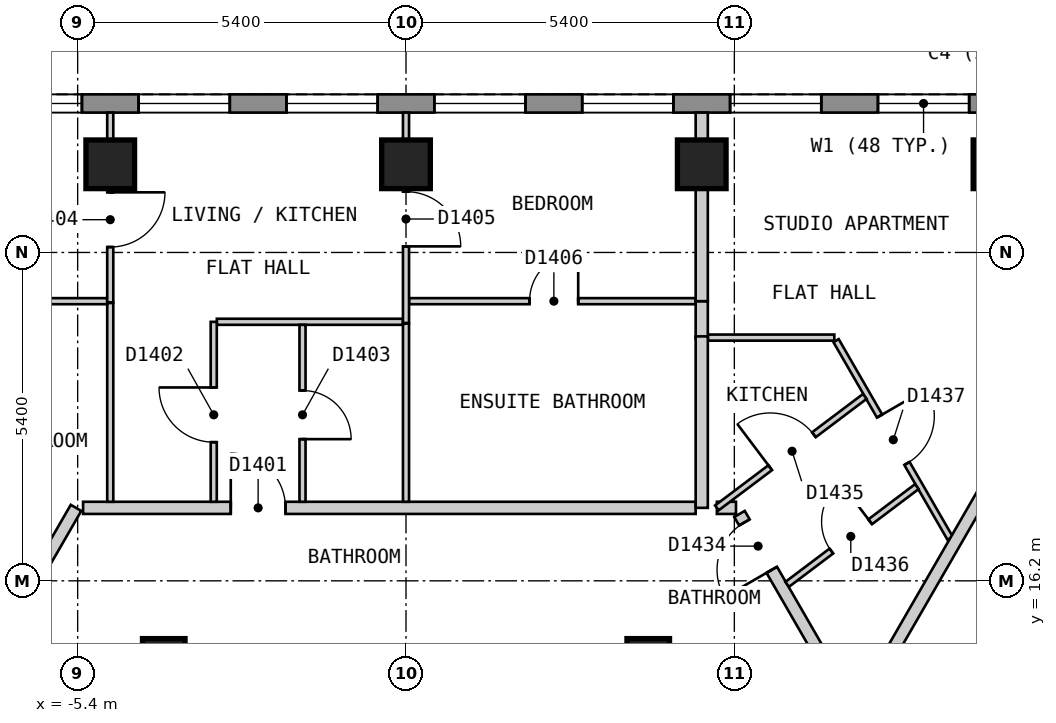
"""IFC4 building model, lengths in metres.
Left out: names, types, materials, properties, quantities, classifications, styles, units other than length and angle.
Written with IfcOpenShell. Run it as: python <this file> out.ifc"""

import sys

from ifc_helpers import new_model, si_unit, direction, frame, frame_2d, origin, origin_2d, place, context, subcontext, project, spatial, polyline, rectangle, outline, extrude, element, fill, save


model = new_model("IFC4")
c1 = context("Model", 3, precision=1e-05, world=origin(), true_north=direction((0.0, 1.0)))
c2 = subcontext(c1, "Body", "Model", "MODEL_VIEW")
j1 = project(units=[si_unit("LENGTHUNIT", "METRE"), si_unit("PLANEANGLEUNIT", "RADIAN")], contexts=[c1])
p1 = place(None, origin())
s1 = spatial("IfcSite", under=j1, at=p1, CompositionType="ELEMENT")
p2 = place(p1, origin())
s2 = spatial("IfcBuilding", under=s1, at=p2, CompositionType="ELEMENT")
p3 = place(p2, frame((0.0, 0.0, 172.2)))
s3 = spatial("IfcBuildingStorey", under=s2, at=p3, CompositionType="ELEMENT", Elevation=172.2)
for number, where, z_axis, x_axis in (
    (1, (9.728, 23.05, 0.0), (0.0, 0.0, 1.0), (-1.0, 0.0, 0.0)),
    (2, (4.864, 23.05, 0.0), (0.0, 0.0, 1.0), (-1.0, 0.0, 0.0)),
    (3, (0.0, 23.05, 0.0), (0.0, 0.0, 1.0), (-1.0, 0.0, 0.0)),
    (4, (-4.864, 23.05, 0.0), (0.0, 0.0, 1.0), (-1.0, 0.0, 0.0)),
):
    element("IfcColumn", number, at=place(p3, frame(where, z_axis=z_axis, x_axis=x_axis)), inside=s3, PredefinedType="COLUMN", context=c2, shape_type="SweptSolid", body=[
        extrude(rectangle(XDim=0.8, YDim=0.8, at=origin_2d()), origin(), (0.0, 0.0, 1.0), 3.0),
    ])
for number, where, z_axis, x_axis in (
    (5, (3.984, 14.9, 0.0), (0.0, 0.0, 1.0), (1.0, 0.0, 0.0)),
    (6, (-3.984, 14.9, 0.0), (0.0, 0.0, 1.0), (1.0, 0.0, 0.0)),
):
    element("IfcColumn", number, at=place(p3, frame(where, z_axis=z_axis, x_axis=x_axis)), inside=s3, PredefinedType="COLUMN", context=c2, shape_type="SweptSolid", body=[
        extrude(rectangle(XDim=0.7, YDim=0.7, at=origin_2d()), origin(), (0.0, 0.0, 1.0), 3.0),
    ])
p4 = place(p3, frame((10.392, 24.05, 0.0), z_axis=(0.0, 0.0, 1.0), x_axis=(-1.0, 0.0, 0.0)))
e7 = element("IfcWall", 7, at=p4, inside=s3, PredefinedType="SOLIDWALL", context=c2, shape_type="SweptSolid", body=[
    extrude(outline(polyline([(0.0, -0.15), (20.784, -0.15), (20.704, 0.15), (0.08, 0.15), (0.0, -0.15)])), origin(), (0.0, 0.0, 1.0), 2.7),
])
p5 = place(p4, frame((1.13, 0.0, 0.15)))
e8 = element("IfcOpeningElement", 8, at=p5, cuts=e7, PredefinedType="OPENING", context=c2, shape_type="SweptSolid", body=[
    extrude(rectangle(XDim=1.5, YDim=2.1, at=frame_2d((0.75, 1.05))), frame((0.0, 0.16, 0.0), z_axis=(0.0, -1.0, 0.0), x_axis=(1.0, 0.0, 0.0)), (0.0, 0.0, 1.0), 0.32),
])
p6 = place(p4, frame((3.562, 0.0, 0.15)))
e9 = element("IfcOpeningElement", 9, at=p6, cuts=e7, PredefinedType="OPENING", context=c2, shape_type="SweptSolid", body=[
    extrude(rectangle(XDim=1.5, YDim=2.1, at=frame_2d((0.75, 1.05))), frame((0.0, 0.16, 0.0), z_axis=(0.0, -1.0, 0.0), x_axis=(1.0, 0.0, 0.0)), (0.0, 0.0, 1.0), 0.32),
])
p7 = place(p4, frame((5.994, 0.0, 0.15)))
e10 = element("IfcOpeningElement", 10, at=p7, cuts=e7, PredefinedType="OPENING", context=c2, shape_type="SweptSolid", body=[
    extrude(rectangle(XDim=1.5, YDim=2.1, at=frame_2d((0.75, 1.05))), frame((0.0, 0.16, 0.0), z_axis=(0.0, -1.0, 0.0), x_axis=(1.0, 0.0, 0.0)), (0.0, 0.0, 1.0), 0.32),
])
p8 = place(p4, frame((8.426, 0.0, 0.15)))
e11 = element("IfcOpeningElement", 11, at=p8, cuts=e7, PredefinedType="OPENING", context=c2, shape_type="SweptSolid", body=[
    extrude(rectangle(XDim=1.5, YDim=2.1, at=frame_2d((0.75, 1.05))), frame((0.0, 0.16, 0.0), z_axis=(0.0, -1.0, 0.0), x_axis=(1.0, 0.0, 0.0)), (0.0, 0.0, 1.0), 0.32),
])
p9 = place(p4, frame((10.858, 0.0, 0.15)))
e12 = element("IfcOpeningElement", 12, at=p9, cuts=e7, PredefinedType="OPENING", context=c2, shape_type="SweptSolid", body=[
    extrude(rectangle(XDim=1.5, YDim=2.1, at=frame_2d((0.75, 1.05))), frame((0.0, 0.16, 0.0), z_axis=(0.0, -1.0, 0.0), x_axis=(1.0, 0.0, 0.0)), (0.0, 0.0, 1.0), 0.32),
])
p10 = place(p4, frame((13.29, 0.0, 0.15)))
e13 = element("IfcOpeningElement", 13, at=p10, cuts=e7, PredefinedType="OPENING", context=c2, shape_type="SweptSolid", body=[
    extrude(rectangle(XDim=1.5, YDim=2.1, at=frame_2d((0.75, 1.05))), frame((0.0, 0.16, 0.0), z_axis=(0.0, -1.0, 0.0), x_axis=(1.0, 0.0, 0.0)), (0.0, 0.0, 1.0), 0.32),
])
p11 = place(p4, frame((15.722, 0.0, 0.15)))
e14 = element("IfcOpeningElement", 14, at=p11, cuts=e7, PredefinedType="OPENING", context=c2, shape_type="SweptSolid", body=[
    extrude(rectangle(XDim=1.5, YDim=2.1, at=frame_2d((0.75, 1.05))), frame((0.0, 0.16, 0.0), z_axis=(0.0, -1.0, 0.0), x_axis=(1.0, 0.0, 0.0)), (0.0, 0.0, 1.0), 0.32),
])
p12 = place(p4, frame((18.154, 0.0, 0.15)))
e15 = element("IfcOpeningElement", 15, at=p12, cuts=e7, PredefinedType="OPENING", context=c2, shape_type="SweptSolid", body=[
    extrude(rectangle(XDim=1.5, YDim=2.1, at=frame_2d((0.75, 1.05))), frame((0.0, 0.16, 0.0), z_axis=(0.0, -1.0, 0.0), x_axis=(1.0, 0.0, 0.0)), (0.0, 0.0, 1.0), 0.32),
])
p13 = place(p3, frame((5.485, 17.3, 0.0), z_axis=(0.0, 0.0, 1.0), x_axis=(0.499965832213, -0.866045129667, 0.0)))
e16 = element("IfcWall", 16, at=p13, inside=s3, PredefinedType="PARTITIONING", context=c2, shape_type="SweptSolid", body=[
    extrude(rectangle(XDim=10.739, YDim=0.2, at=frame_2d((5.369, 0.0))), origin(), (0.0, 0.0, 1.0), 2.7),
])
p14 = place(p13, frame((9.048, 0.0, 0.0)))
e17 = element("IfcOpeningElement", 17, at=p14, cuts=e16, PredefinedType="OPENING", context=c2, shape_type="SweptSolid", body=[
    extrude(rectangle(XDim=1.0, YDim=2.1, at=frame_2d((0.5, 1.05))), frame((0.0, 0.11, 0.0), z_axis=(0.0, -1.0, 0.0), x_axis=(1.0, 0.0, 0.0)), (0.0, 0.0, 1.0), 0.22),
])
p15 = place(p13, frame((0.161, 0.0, 0.0)))
e18 = element("IfcOpeningElement", 18, at=p15, cuts=e16, PredefinedType="OPENING", context=c2, shape_type="SweptSolid", body=[
    extrude(rectangle(XDim=0.9, YDim=2.1, at=frame_2d((0.45, 1.05))), frame((0.0, 0.11, 0.0), z_axis=(0.0, -1.0, 0.0), x_axis=(1.0, 0.0, 0.0)), (0.0, 0.0, 1.0), 0.22),
])
p16 = place(p3, frame((-5.311, 17.4, 0.0), z_axis=(0.0, 0.0, 1.0), x_axis=(1.0, 0.0, 0.0)))
e19 = element("IfcWall", 19, at=p16, inside=s3, PredefinedType="PARTITIONING", context=c2, shape_type="SweptSolid", body=[
    extrude(rectangle(XDim=10.075, YDim=0.2, at=frame_2d((5.038, 0.0))), origin(), (0.0, 0.0, 1.0), 2.7),
])
p17 = place(p16, frame((2.429, 0.0, 0.0)))
e20 = element("IfcOpeningElement", 20, at=p17, cuts=e19, PredefinedType="OPENING", context=c2, shape_type="SweptSolid", body=[
    extrude(rectangle(XDim=0.9, YDim=2.1, at=frame_2d((0.45, 1.05))), frame((0.0, 0.11, 0.0), z_axis=(0.0, -1.0, 0.0), x_axis=(1.0, 0.0, 0.0)), (0.0, 0.0, 1.0), 0.22),
])
p18 = place(p3, frame((5.113, 17.4, 0.0), z_axis=(0.0, 0.0, 1.0), x_axis=(1.0, 0.0, 0.0)))
e21 = element("IfcWall", 21, at=p18, inside=s3, PredefinedType="PARTITIONING", context=c2, shape_type="SweptSolid", body=[
    extrude(rectangle(XDim=0.314, YDim=0.2, at=frame_2d((0.157, 0.0))), origin(), (0.0, 0.0, 1.0), 2.7),
])
p19 = place(p3, frame((-10.854, 8.0, 0.0), z_axis=(0.0, 0.0, 1.0), x_axis=(0.499997637144, 0.866026767976, 0.0)))
e22 = element("IfcWall", 22, at=p19, inside=s3, PredefinedType="PARTITIONING", context=c2, shape_type="SweptSolid", body=[
    extrude(rectangle(XDim=10.854, YDim=0.2, at=frame_2d((5.427, 0.0))), origin(), (0.0, 0.0, 1.0), 2.7),
])
p20 = place(p19, frame((0.721, 0.0, 0.0)))
e23 = element("IfcOpeningElement", 23, at=p20, cuts=e22, PredefinedType="OPENING", context=c2, shape_type="SweptSolid", body=[
    extrude(rectangle(XDim=1.0, YDim=2.1, at=frame_2d((0.5, 1.05))), frame((0.0, 0.11, 0.0), z_axis=(0.0, -1.0, 0.0), x_axis=(1.0, 0.0, 0.0)), (0.0, 0.0, 1.0), 0.22),
])
p21 = place(p3, frame((7.073, 20.15, 0.0), z_axis=(0.0, 0.0, 1.0), x_axis=(0.499917691695, -0.866072919292, 0.0)))
e24 = element("IfcWall", 24, at=p21, inside=s3, PredefinedType="PARTITIONING", context=c2, shape_type="SweptSolid", body=[
    extrude(rectangle(XDim=3.753, YDim=0.1, at=frame_2d((1.876, 0.0))), origin(), (0.0, 0.0, 1.0), 2.7),
])
p22 = place(p21, frame((1.432, 0.0, 0.0)))
e25 = element("IfcOpeningElement", 25, at=p22, cuts=e24, PredefinedType="OPENING", context=c2, shape_type="SweptSolid", body=[
    extrude(rectangle(XDim=0.9, YDim=2.1, at=frame_2d((0.45, 1.05))), frame((0.0, 0.06, 0.0), z_axis=(0.0, -1.0, 0.0), x_axis=(1.0, 0.0, 0.0)), (0.0, 0.0, 1.0), 0.12),
])
p23 = place(p3, frame((-4.864, 20.769, 0.0), z_axis=(0.0, 0.0, 1.0), x_axis=(0.0, -1.0, 0.0)))
e26 = element("IfcWall", 26, at=p23, inside=s3, PredefinedType="PARTITIONING", context=c2, shape_type="SweptSolid", body=[
    extrude(rectangle(XDim=3.269, YDim=0.1, at=frame_2d((1.635, 0.0))), origin(), (0.0, 0.0, 1.0), 2.7),
])
p24 = place(p3, frame((0.0, 20.43, 0.0), z_axis=(0.0, 0.0, 1.0), x_axis=(0.0, -1.0, 0.0)))
e27 = element("IfcWall", 27, at=p24, inside=s3, PredefinedType="PARTITIONING", context=c2, shape_type="SweptSolid", body=[
    extrude(rectangle(XDim=2.93, YDim=0.1, at=frame_2d((1.465, 0.0))), origin(), (0.0, 0.0, 1.0), 2.7),
])
p25 = place(p3, frame((4.964, 20.2, 0.0), z_axis=(0.0, 0.0, 1.0), x_axis=(1.0, 0.0, 0.0)))
e28 = element("IfcWall", 28, at=p25, inside=s3, PredefinedType="PARTITIONING", context=c2, shape_type="SweptSolid", body=[
    extrude(rectangle(XDim=2.08, YDim=0.1, at=frame_2d((1.04, 0.0))), origin(), (0.0, 0.0, 1.0), 2.7),
])
p26 = place(p3, frame((-3.111, 20.46, 0.0), z_axis=(0.0, 0.0, 1.0), x_axis=(1.0, 0.0, 0.0)))
e29 = element("IfcWall", 29, at=p26, inside=s3, PredefinedType="PARTITIONING", context=c2, shape_type="SweptSolid", body=[
    extrude(rectangle(XDim=3.061, YDim=0.1, at=frame_2d((1.531, 0.0))), origin(), (0.0, 0.0, 1.0), 2.7),
])
p27 = place(p3, frame((-7.331, 20.799, 0.0), z_axis=(0.0, 0.0, 1.0), x_axis=(1.0, 0.0, 0.0)))
e30 = element("IfcWall", 30, at=p27, inside=s3, PredefinedType="PARTITIONING", context=c2, shape_type="SweptSolid", body=[
    extrude(rectangle(XDim=2.417, YDim=0.1, at=frame_2d((1.208, 0.0))), origin(), (0.0, 0.0, 1.0), 2.7),
])
p28 = place(p3, frame((0.05, 20.799, 0.0), z_axis=(0.0, 0.0, 1.0), x_axis=(1.0, 0.0, 0.0)))
e31 = element("IfcWall", 31, at=p28, inside=s3, PredefinedType="PARTITIONING", context=c2, shape_type="SweptSolid", body=[
    extrude(rectangle(XDim=4.714, YDim=0.1, at=frame_2d((2.357, 0.0))), origin(), (0.0, 0.0, 1.0), 2.7),
])
p29 = place(p28, frame((1.982, 0.0, 0.0)))
e32 = element("IfcOpeningElement", 32, at=p29, cuts=e31, PredefinedType="OPENING", context=c2, shape_type="SweptSolid", body=[
    extrude(rectangle(XDim=0.8, YDim=2.1, at=frame_2d((0.4, 1.05))), frame((0.0, 0.06, 0.0), z_axis=(0.0, -1.0, 0.0), x_axis=(1.0, 0.0, 0.0)), (0.0, 0.0, 1.0), 0.12),
])
p30 = place(p3, frame((0.0, 20.44, 0.0), z_axis=(0.0, 0.0, 1.0), x_axis=(0.0, 1.0, 0.0)))
e33 = element("IfcWall", 33, at=p30, inside=s3, PredefinedType="PARTITIONING", context=c2, shape_type="SweptSolid", body=[
    extrude(rectangle(XDim=3.46, YDim=0.1, at=frame_2d((1.73, 0.0))), origin(), (0.0, 0.0, 1.0), 2.7),
])
p31 = place(p30, frame((1.26, 0.0, 0.0)))
e34 = element("IfcOpeningElement", 34, at=p31, cuts=e33, PredefinedType="OPENING", context=c2, shape_type="SweptSolid", body=[
    extrude(rectangle(XDim=0.9, YDim=2.1, at=frame_2d((0.45, 1.05))), frame((0.0, 0.06, 0.0), z_axis=(0.0, -1.0, 0.0), x_axis=(1.0, 0.0, 0.0)), (0.0, 0.0, 1.0), 0.12),
])
p32 = place(p3, frame((-3.162, 17.5, 0.0), z_axis=(0.0, 0.0, 1.0), x_axis=(0.0, 1.0, 0.0)))
e35 = element("IfcWall", 35, at=p32, inside=s3, PredefinedType="PARTITIONING", context=c2, shape_type="SweptSolid", body=[
    extrude(rectangle(XDim=2.959, YDim=0.1, at=frame_2d((1.479, 0.0))), origin(), (0.0, 0.0, 1.0), 2.7),
])
p33 = place(p32, frame((0.98, 0.0, 0.0)))
e36 = element("IfcOpeningElement", 36, at=p33, cuts=e35, PredefinedType="OPENING", context=c2, shape_type="SweptSolid", body=[
    extrude(rectangle(XDim=0.9, YDim=2.1, at=frame_2d((0.45, 1.05))), frame((0.0, 0.06, 0.0), z_axis=(0.0, -1.0, 0.0), x_axis=(1.0, 0.0, 0.0)), (0.0, 0.0, 1.0), 0.12),
])
p34 = place(p3, frame((-4.864, 20.779, 0.0), z_axis=(0.0, 0.0, 1.0), x_axis=(0.0, 1.0, 0.0)))
e37 = element("IfcWall", 37, at=p34, inside=s3, PredefinedType="PARTITIONING", context=c2, shape_type="SweptSolid", body=[
    extrude(rectangle(XDim=3.121, YDim=0.1, at=frame_2d((1.561, 0.0))), origin(), (0.0, 0.0, 1.0), 2.7),
])
p35 = place(p34, frame((0.91, 0.0, 0.0)))
e38 = element("IfcOpeningElement", 38, at=p35, cuts=e37, PredefinedType="OPENING", context=c2, shape_type="SweptSolid", body=[
    extrude(rectangle(XDim=0.9, YDim=2.1, at=frame_2d((0.45, 1.05))), frame((0.0, 0.06, 0.0), z_axis=(0.0, -1.0, 0.0), x_axis=(1.0, 0.0, 0.0)), (0.0, 0.0, 1.0), 0.12),
])
p36 = place(p3, frame((-1.702, 17.5, 0.0), z_axis=(0.0, 0.0, 1.0), x_axis=(0.0, 1.0, 0.0)))
e39 = element("IfcWall", 39, at=p36, inside=s3, PredefinedType="PARTITIONING", context=c2, shape_type="SweptSolid", body=[
    extrude(rectangle(XDim=2.91, YDim=0.1, at=frame_2d((1.455, 0.0))), origin(), (0.0, 0.0, 1.0), 2.7),
])
p37 = place(p36, frame((1.03, 0.0, 0.0)))
e40 = element("IfcOpeningElement", 40, at=p37, cuts=e39, PredefinedType="OPENING", context=c2, shape_type="SweptSolid", body=[
    extrude(rectangle(XDim=0.8, YDim=2.1, at=frame_2d((0.4, 1.05))), frame((0.0, 0.06, 0.0), z_axis=(0.0, -1.0, 0.0), x_axis=(1.0, 0.0, 0.0)), (0.0, 0.0, 1.0), 0.12),
])
p38 = place(p3, frame((6.269, 16.142, 0.0), z_axis=(0.0, 0.0, 1.0), x_axis=(0.798549086509, 0.601929693931, 0.0)))
e41 = element("IfcWall", 41, at=p38, inside=s3, PredefinedType="PARTITIONING", context=c2, shape_type="SweptSolid", body=[
    extrude(rectangle(XDim=2.67, YDim=0.1, at=frame_2d((1.335, 0.0))), origin(), (0.0, 0.0, 1.0), 2.7),
])
p39 = place(p38, frame((0.91, 0.0, 0.0)))
e42 = element("IfcOpeningElement", 42, at=p39, cuts=e41, PredefinedType="OPENING", context=c2, shape_type="SweptSolid", body=[
    extrude(rectangle(XDim=0.8, YDim=2.1, at=frame_2d((0.4, 1.05))), frame((0.0, 0.06, 0.0), z_axis=(0.0, -1.0, 0.0), x_axis=(1.0, 0.0, 0.0)), (0.0, 0.0, 1.0), 0.12),
])
p40 = place(p3, frame((5.113, 17.4, 0.0), z_axis=(0.0, 0.0, 1.0), x_axis=(0.798718434647, 0.601704962714, 0.0)))
e43 = element("IfcWall", 43, at=p40, inside=s3, PredefinedType="PARTITIONING", context=c2, shape_type="SweptSolid", body=[
    extrude(rectangle(XDim=3.045, YDim=0.1, at=frame_2d((1.522, 0.0))), origin(), (0.0, 0.0, 1.0), 2.7),
])
p41 = place(p40, frame((1.098, 0.0, 0.0)))
e44 = element("IfcOpeningElement", 44, at=p41, cuts=e43, PredefinedType="OPENING", context=c2, shape_type="SweptSolid", body=[
    extrude(rectangle(XDim=0.9, YDim=2.1, at=frame_2d((0.45, 1.05))), frame((0.0, 0.06, 0.0), z_axis=(0.0, -1.0, 0.0), x_axis=(1.0, 0.0, 0.0)), (0.0, 0.0, 1.0), 0.12),
])
p42 = place(p3, frame((4.864, 20.799, 0.0), z_axis=(0.0, 0.0, 1.0), x_axis=(0.0, -1.0, 0.0)))
e45 = element("IfcWall", 45, at=p42, inside=s3, PredefinedType="PARTITIONING", context=c2, shape_type="SweptSolid", body=[
    extrude(rectangle(XDim=0.619, YDim=0.2, at=frame_2d((0.31, 0.0))), origin(), (0.0, 0.0, 1.0), 2.7),
])
p43 = place(p3, frame((7.448, 14.1, 0.0), z_axis=(0.0, 0.0, 1.0), x_axis=(0.500013426303, 0.866017651966, 0.0)))
e46 = element("IfcWall", 46, at=p43, inside=s3, PredefinedType="PARTITIONING", context=c2, shape_type="SweptSolid", body=[
    extrude(rectangle(XDim=4.358, YDim=0.2, at=frame_2d((2.179, 0.0))), origin(), (0.0, 0.0, 1.0), 2.7),
])
p44 = place(p3, frame((4.864, 17.4, 0.0), z_axis=(0.0, 0.0, 1.0), x_axis=(0.0, 1.0, 0.0)))
e47 = element("IfcWall", 47, at=p44, inside=s3, PredefinedType="PARTITIONING", context=c2, shape_type="SweptSolid", body=[
    extrude(rectangle(XDim=2.82, YDim=0.2, at=frame_2d((1.41, 0.0))), origin(), (0.0, 0.0, 1.0), 2.7),
])
p45 = place(p3, frame((4.864, 20.799, 0.0), z_axis=(0.0, 0.0, 1.0), x_axis=(0.0, 1.0, 0.0)))
e48 = element("IfcWall", 48, at=p45, inside=s3, PredefinedType="PARTITIONING", context=c2, shape_type="SweptSolid", body=[
    extrude(rectangle(XDim=3.101, YDim=0.2, at=frame_2d((1.55, 0.0))), origin(), (0.0, 0.0, 1.0), 2.7),
])
p46 = place(p5, origin())
e49 = element("IfcWindow", 49, at=p46, inside=s3, PartitioningType="SINGLE_PANEL", PredefinedType="WINDOW", context=c2, shape_type="SweptSolid", body=[
    extrude(rectangle(XDim=1.5, YDim=2.1, at=frame_2d((0.75, 1.05))), frame((0.0, 0.03, 0.0), z_axis=(0.0, -1.0, 0.0), x_axis=(1.0, 0.0, 0.0)), (0.0, 0.0, 1.0), 0.06),
])
fill(e8, e49)
p47 = place(p6, origin())
e50 = element("IfcWindow", 50, at=p47, inside=s3, PartitioningType="SINGLE_PANEL", PredefinedType="WINDOW", context=c2, shape_type="SweptSolid", body=[
    extrude(rectangle(XDim=1.5, YDim=2.1, at=frame_2d((0.75, 1.05))), frame((0.0, 0.03, 0.0), z_axis=(0.0, -1.0, 0.0), x_axis=(1.0, 0.0, 0.0)), (0.0, 0.0, 1.0), 0.06),
])
fill(e9, e50)
p48 = place(p7, origin())
e51 = element("IfcWindow", 51, at=p48, inside=s3, PartitioningType="SINGLE_PANEL", PredefinedType="WINDOW", context=c2, shape_type="SweptSolid", body=[
    extrude(rectangle(XDim=1.5, YDim=2.1, at=frame_2d((0.75, 1.05))), frame((0.0, 0.03, 0.0), z_axis=(0.0, -1.0, 0.0), x_axis=(1.0, 0.0, 0.0)), (0.0, 0.0, 1.0), 0.06),
])
fill(e10, e51)
p49 = place(p8, origin())
e52 = element("IfcWindow", 52, at=p49, inside=s3, PartitioningType="SINGLE_PANEL", PredefinedType="WINDOW", context=c2, shape_type="SweptSolid", body=[
    extrude(rectangle(XDim=1.5, YDim=2.1, at=frame_2d((0.75, 1.05))), frame((0.0, 0.03, 0.0), z_axis=(0.0, -1.0, 0.0), x_axis=(1.0, 0.0, 0.0)), (0.0, 0.0, 1.0), 0.06),
])
fill(e11, e52)
p50 = place(p9, origin())
e53 = element("IfcWindow", 53, at=p50, inside=s3, PartitioningType="SINGLE_PANEL", PredefinedType="WINDOW", context=c2, shape_type="SweptSolid", body=[
    extrude(rectangle(XDim=1.5, YDim=2.1, at=frame_2d((0.75, 1.05))), frame((0.0, 0.03, 0.0), z_axis=(0.0, -1.0, 0.0), x_axis=(1.0, 0.0, 0.0)), (0.0, 0.0, 1.0), 0.06),
])
fill(e12, e53)
p51 = place(p10, origin())
e54 = element("IfcWindow", 54, at=p51, inside=s3, PartitioningType="SINGLE_PANEL", PredefinedType="WINDOW", context=c2, shape_type="SweptSolid", body=[
    extrude(rectangle(XDim=1.5, YDim=2.1, at=frame_2d((0.75, 1.05))), frame((0.0, 0.03, 0.0), z_axis=(0.0, -1.0, 0.0), x_axis=(1.0, 0.0, 0.0)), (0.0, 0.0, 1.0), 0.06),
])
fill(e13, e54)
p52 = place(p11, origin())
e55 = element("IfcWindow", 55, at=p52, inside=s3, PartitioningType="SINGLE_PANEL", PredefinedType="WINDOW", context=c2, shape_type="SweptSolid", body=[
    extrude(rectangle(XDim=1.5, YDim=2.1, at=frame_2d((0.75, 1.05))), frame((0.0, 0.03, 0.0), z_axis=(0.0, -1.0, 0.0), x_axis=(1.0, 0.0, 0.0)), (0.0, 0.0, 1.0), 0.06),
])
fill(e14, e55)
p53 = place(p17, origin())
e56 = element("IfcDoor", 56, at=p53, inside=s3, OperationType="SINGLE_SWING_LEFT", PredefinedType="DOOR", context=c2, shape_type="SweptSolid", body=[
    extrude(rectangle(XDim=0.9, YDim=2.1, at=frame_2d((0.45, 1.05))), frame((0.0, 0.025, 0.0), z_axis=(0.0, -1.0, 0.0), x_axis=(1.0, 0.0, 0.0)), (0.0, 0.0, 1.0), 0.05),
])
fill(e20, e56)
p54 = place(p33, origin())
e57 = element("IfcDoor", 57, at=p54, inside=s3, OperationType="SINGLE_SWING_RIGHT", PredefinedType="DOOR", context=c2, shape_type="SweptSolid", body=[
    extrude(rectangle(XDim=0.9, YDim=2.1, at=frame_2d((0.45, 1.05))), frame((0.0, 0.025, 0.0), z_axis=(0.0, -1.0, 0.0), x_axis=(1.0, 0.0, 0.0)), (0.0, 0.0, 1.0), 0.05),
])
fill(e36, e57)
p55 = place(p37, origin())
e58 = element("IfcDoor", 58, at=p55, inside=s3, OperationType="SINGLE_SWING_LEFT", PredefinedType="DOOR", context=c2, shape_type="SweptSolid", body=[
    extrude(rectangle(XDim=0.8, YDim=2.1, at=frame_2d((0.4, 1.05))), frame((0.0, 0.025, 0.0), z_axis=(0.0, -1.0, 0.0), x_axis=(1.0, 0.0, 0.0)), (0.0, 0.0, 1.0), 0.05),
])
fill(e40, e58)
p56 = place(p35, origin())
e59 = element("IfcDoor", 59, at=p56, inside=s3, OperationType="SINGLE_SWING_RIGHT", PredefinedType="DOOR", context=c2, shape_type="SweptSolid", body=[
    extrude(rectangle(XDim=0.9, YDim=2.1, at=frame_2d((0.45, 1.05))), frame((0.0, 0.025, 0.0), z_axis=(0.0, -1.0, 0.0), x_axis=(1.0, 0.0, 0.0)), (0.0, 0.0, 1.0), 0.05),
])
fill(e38, e59)
p57 = place(p31, origin())
e60 = element("IfcDoor", 60, at=p57, inside=s3, OperationType="SINGLE_SWING_LEFT", PredefinedType="DOOR", context=c2, shape_type="SweptSolid", body=[
    extrude(rectangle(XDim=0.9, YDim=2.1, at=frame_2d((0.45, 1.05))), frame((0.0, 0.025, 0.0), z_axis=(0.0, -1.0, 0.0), x_axis=(1.0, 0.0, 0.0)), (0.0, 0.0, 1.0), 0.05),
])
fill(e34, e60)
p58 = place(p29, origin())
e61 = element("IfcDoor", 61, at=p58, inside=s3, OperationType="SINGLE_SWING_RIGHT", PredefinedType="DOOR", context=c2, shape_type="SweptSolid", body=[
    extrude(rectangle(XDim=0.8, YDim=2.1, at=frame_2d((0.4, 1.05))), frame((0.0, 0.025, 0.0), z_axis=(0.0, -1.0, 0.0), x_axis=(1.0, 0.0, 0.0)), (0.0, 0.0, 1.0), 0.05),
])
fill(e32, e61)
p59 = place(p15, origin())
e62 = element("IfcDoor", 62, at=p59, inside=s3, OperationType="SINGLE_SWING_RIGHT", PredefinedType="DOOR", context=c2, shape_type="SweptSolid", body=[
    extrude(rectangle(XDim=0.9, YDim=2.1, at=frame_2d((0.45, 1.05))), frame((0.0, 0.025, 0.0), z_axis=(0.0, -1.0, 0.0), x_axis=(1.0, 0.0, 0.0)), (0.0, 0.0, 1.0), 0.05),
])
fill(e18, e62)
p60 = place(p41, origin())
e63 = element("IfcDoor", 63, at=p60, inside=s3, OperationType="SINGLE_SWING_LEFT", PredefinedType="DOOR", context=c2, shape_type="SweptSolid", body=[
    extrude(rectangle(XDim=0.9, YDim=2.1, at=frame_2d((0.45, 1.05))), frame((0.0, 0.025, 0.0), z_axis=(0.0, -1.0, 0.0), x_axis=(1.0, 0.0, 0.0)), (0.0, 0.0, 1.0), 0.05),
])
fill(e44, e63)
p61 = place(p39, origin())
e64 = element("IfcDoor", 64, at=p61, inside=s3, OperationType="SINGLE_SWING_RIGHT", PredefinedType="DOOR", context=c2, shape_type="SweptSolid", body=[
    extrude(rectangle(XDim=0.8, YDim=2.1, at=frame_2d((0.4, 1.05))), frame((0.0, 0.025, 0.0), z_axis=(0.0, -1.0, 0.0), x_axis=(1.0, 0.0, 0.0)), (0.0, 0.0, 1.0), 0.05),
])
fill(e42, e64)
p62 = place(p22, origin())
e65 = element("IfcDoor", 65, at=p62, inside=s3, OperationType="SINGLE_SWING_LEFT", PredefinedType="DOOR", context=c2, shape_type="SweptSolid", body=[
    extrude(rectangle(XDim=0.9, YDim=2.1, at=frame_2d((0.45, 1.05))), frame((0.0, 0.025, 0.0), z_axis=(0.0, -1.0, 0.0), x_axis=(1.0, 0.0, 0.0)), (0.0, 0.0, 1.0), 0.05),
])
fill(e25, e65)
save(model, sys.argv[1])
